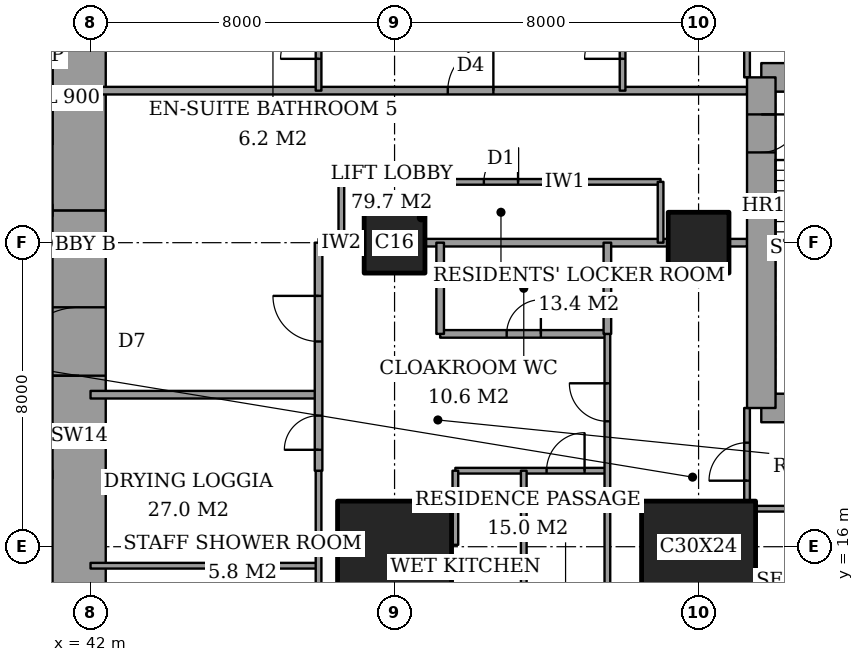
"""IFC4 building model, lengths in metres.
Left out: names, types, materials, properties, quantities, classifications, styles, units other than length and angle.
Written with IfcOpenShell. Run it as: python <this file> out.ifc"""

import sys

from ifc_helpers import new_model, si_unit, direction, frame, frame_2d, origin, origin_2d, place, context, subcontext, project, spatial, rectangle, extrude, element, fill, save


model = new_model("IFC4")
c1 = context("Model", 3, precision=1e-05, world=origin(), true_north=direction((0.0, 1.0)))
c2 = subcontext(c1, "Body", "Model", "MODEL_VIEW")
j1 = project(units=[si_unit("LENGTHUNIT", "METRE"), si_unit("PLANEANGLEUNIT", "RADIAN")], contexts=[c1])
p1 = place(None, origin())
s1 = spatial("IfcSite", under=j1, at=p1, CompositionType="ELEMENT")
p2 = place(p1, origin())
s2 = spatial("IfcBuilding", under=s1, at=p2, CompositionType="ELEMENT")
p3 = place(p2, frame((0.0, 0.0, 252.0)))
s3 = spatial("IfcBuildingStorey", under=s2, at=p3, CompositionType="ELEMENT", Elevation=252.0)
p4 = place(p3, frame((50.0, 16.0, 0.0), z_axis=(0.0, 0.0, 1.0), x_axis=(1.0, 0.0, 0.0)))
e1 = element("IfcColumn", 1, at=p4, inside=s3, PredefinedType="COLUMN", context=c2, shape_type="SweptSolid", body=[
    extrude(rectangle(XDim=3.0, YDim=2.4, at=origin_2d()), origin(), (0.0, 0.0, 1.0), 3.6),
])
p5 = place(p3, frame((50.0, 24.0, 0.0), z_axis=(0.0, 0.0, 1.0), x_axis=(1.0, 0.0, 0.0)))
e2 = element("IfcColumn", 2, at=p5, inside=s3, PredefinedType="COLUMN", context=c2, shape_type="SweptSolid", body=[
    extrude(rectangle(XDim=1.6, YDim=1.6, at=origin_2d()), origin(), (0.0, 0.0, 1.0), 3.6),
])
p6 = place(p3, frame((58.0, 16.0, 0.0), z_axis=(0.0, 0.0, 1.0), x_axis=(1.0, 0.0, 0.0)))
e3 = element("IfcColumn", 3, at=p6, inside=s3, PredefinedType="COLUMN", context=c2, shape_type="SweptSolid", body=[
    extrude(rectangle(XDim=3.0, YDim=2.4, at=origin_2d()), origin(), (0.0, 0.0, 1.0), 3.6),
])
p7 = place(p3, frame((58.0, 24.0, 0.0), z_axis=(0.0, 0.0, 1.0), x_axis=(1.0, 0.0, 0.0)))
e4 = element("IfcColumn", 4, at=p7, inside=s3, PredefinedType="COLUMN", context=c2, shape_type="SweptSolid", body=[
    extrude(rectangle(XDim=1.6, YDim=1.6, at=origin_2d()), origin(), (0.0, 0.0, 1.0), 3.6),
])
p8 = place(p3, frame((41.7, 13.0, 0.0), z_axis=(0.0, 0.0, 1.0), x_axis=(0.0, 1.0, 0.0)))
e5 = element("IfcWall", 5, at=p8, inside=s3, PredefinedType="SHEAR", context=c2, shape_type="SweptSolid", body=[
    extrude(rectangle(XDim=11.85, YDim=1.4, at=frame_2d((5.925, 0.0))), origin(), (0.0, 0.0, 1.0), 3.6),
])
p9 = place(p8, frame((7.5, 0.0, 0.0)))
e6 = element("IfcOpeningElement", 6, at=p9, cuts=e5, PredefinedType="OPENING", context=c2, shape_type="SweptSolid", body=[
    extrude(rectangle(XDim=1.8, YDim=2.4, at=frame_2d((0.9, 1.2))), frame((0.0, 0.71, 0.0), z_axis=(0.0, -1.0, 0.0), x_axis=(1.0, 0.0, 0.0)), (0.0, 0.0, 1.0), 1.42),
])
p10 = place(p3, frame((41.7, 24.85, 0.0), z_axis=(0.0, 0.0, 1.0), x_axis=(0.0, 1.0, 0.0)))
e7 = element("IfcWall", 7, at=p10, inside=s3, PredefinedType="SHEAR", context=c2, shape_type="SweptSolid", body=[
    extrude(rectangle(XDim=10.15, YDim=1.4, at=frame_2d((5.075, 0.0))), origin(), (0.0, 0.0, 1.0), 3.6),
])
for number, where, z_axis, x_axis in (
    (8, (59.65, 19.65, 0.0), (0.0, 0.0, 1.0), (1.0, 0.0, 0.0)),
    (9, (64.1, 28.35, 0.0), (0.0, 0.0, 1.0), (-1.0, 0.0, 0.0)),
):
    element("IfcWall", number, at=place(p3, frame(where, z_axis=z_axis, x_axis=x_axis)), inside=s3, PredefinedType="SHEAR", context=c2, shape_type="SweptSolid", body=[
        extrude(rectangle(XDim=4.45, YDim=0.75, at=frame_2d((2.225, 0.0))), origin(), (0.0, 0.0, 1.0), 3.6),
    ])
p11 = place(p3, frame((59.65, 28.35, 0.0), z_axis=(0.0, 0.0, 1.0), x_axis=(0.0, -1.0, 0.0)))
e10 = element("IfcWall", 10, at=p11, inside=s3, PredefinedType="SHEAR", context=c2, shape_type="SweptSolid", body=[
    extrude(rectangle(XDim=8.7, YDim=0.75, at=frame_2d((4.35, 0.0))), origin(), (0.0, 0.0, 1.0), 3.6),
])
p12 = place(p11, frame((0.975, 0.0, 0.0)))
e11 = element("IfcOpeningElement", 11, at=p12, cuts=e10, PredefinedType="OPENING", context=c2, shape_type="SweptSolid", body=[
    extrude(rectangle(XDim=1.0, YDim=2.1, at=frame_2d((0.5, 1.05))), frame((0.0, 0.385, 0.0), z_axis=(0.0, -1.0, 0.0), x_axis=(1.0, 0.0, 0.0)), (0.0, 0.0, 1.0), 0.77),
])
p13 = place(p3, frame((42.0, 15.5, 0.0), z_axis=(0.0, 0.0, 1.0), x_axis=(1.0, 0.0, 0.0)))
e12 = element("IfcWall", 12, at=p13, inside=s3, PredefinedType="PARTITIONING", context=c2, shape_type="SweptSolid", body=[
    extrude(rectangle(XDim=6.0, YDim=0.15, at=frame_2d((3.0, 0.0))), origin(), (0.0, 0.0, 1.0), 3.35),
])
p14 = place(p3, frame((48.0, 16.05, 0.0), z_axis=(0.0, 0.0, 1.0), x_axis=(1.0, 0.0, 0.0)))
e13 = element("IfcWall", 13, at=p14, inside=s3, PredefinedType="PARTITIONING", context=c2, shape_type="SweptSolid", body=[
    extrude(rectangle(XDim=0.5, YDim=0.15, at=frame_2d((0.25, 0.0))), origin(), (0.0, 0.0, 1.0), 2.634),
])
p15 = place(p3, frame((59.5, 17.0, 0.0), z_axis=(0.0, 0.0, 1.0), x_axis=(1.0, 0.0, 0.0)))
e14 = element("IfcWall", 14, at=p15, inside=s3, PredefinedType="PARTITIONING", context=c2, shape_type="SweptSolid", body=[
    extrude(rectangle(XDim=6.95, YDim=0.15, at=frame_2d((3.475, 0.0))), origin(), (0.0, 0.0, 1.0), 3.35),
])
p16 = place(p3, frame((51.6, 18.0, 0.0), z_axis=(0.0, 0.0, 1.0), x_axis=(1.0, 0.0, 0.0)))
e15 = element("IfcWall", 15, at=p16, inside=s3, PredefinedType="PARTITIONING", context=c2, shape_type="SweptSolid", body=[
    extrude(rectangle(XDim=4.0, YDim=0.15, at=frame_2d((2.0, 0.0))), origin(), (0.0, 0.0, 1.0), 3.35),
])
p17 = place(p16, frame((2.4, 0.0, 0.0)))
e16 = element("IfcOpeningElement", 16, at=p17, cuts=e15, PredefinedType="OPENING", context=c2, shape_type="SweptSolid", body=[
    extrude(rectangle(XDim=1.0, YDim=2.1, at=frame_2d((0.5, 1.05))), frame((0.0, 0.085, 0.0), z_axis=(0.0, -1.0, 0.0), x_axis=(1.0, 0.0, 0.0)), (0.0, 0.0, 1.0), 0.17),
])
p18 = place(p3, frame((42.0, 20.0, 0.0), z_axis=(0.0, 0.0, 1.0), x_axis=(1.0, 0.0, 0.0)))
e17 = element("IfcWall", 17, at=p18, inside=s3, PredefinedType="PARTITIONING", context=c2, shape_type="SweptSolid", body=[
    extrude(rectangle(XDim=6.0, YDim=0.2, at=frame_2d((3.0, 0.0))), origin(), (0.0, 0.0, 1.0), 3.35),
])
p19 = place(p3, frame((51.2, 21.6, 0.0), z_axis=(0.0, 0.0, 1.0), x_axis=(1.0, 0.0, 0.0)))
e18 = element("IfcWall", 18, at=p19, inside=s3, PredefinedType="PARTITIONING", context=c2, shape_type="SweptSolid", body=[
    extrude(rectangle(XDim=4.4, YDim=0.2, at=frame_2d((2.2, 0.0))), origin(), (0.0, 0.0, 1.0), 3.35),
])
p20 = place(p19, frame((1.75, 0.0, 0.0)))
e19 = element("IfcOpeningElement", 19, at=p20, cuts=e18, PredefinedType="OPENING", context=c2, shape_type="SweptSolid", body=[
    extrude(rectangle(XDim=0.9, YDim=2.1, at=frame_2d((0.45, 1.05))), frame((0.0, 0.11, 0.0), z_axis=(0.0, -1.0, 0.0), x_axis=(1.0, 0.0, 0.0)), (0.0, 0.0, 1.0), 0.22),
])
p21 = place(p3, frame((48.0, 24.0, 0.0), z_axis=(0.0, 0.0, 1.0), x_axis=(1.0, 0.0, 0.0)))
e20 = element("IfcWall", 20, at=p21, inside=s3, PredefinedType="PARTITIONING", context=c2, shape_type="SweptSolid", body=[
    extrude(rectangle(XDim=1.2, YDim=0.2, at=frame_2d((0.6, 0.0))), origin(), (0.0, 0.0, 1.0), 3.35),
])
p22 = place(p3, frame((50.8, 24.0, 0.0), z_axis=(0.0, 0.0, 1.0), x_axis=(1.0, 0.0, 0.0)))
e21 = element("IfcWall", 21, at=p22, inside=s3, PredefinedType="PARTITIONING", context=c2, shape_type="SweptSolid", body=[
    extrude(rectangle(XDim=6.4, YDim=0.2, at=frame_2d((3.2, 0.0))), origin(), (0.0, 0.0, 1.0), 3.35),
])
p23 = place(p3, frame((58.8, 24.0, 0.0), z_axis=(0.0, 0.0, 1.0), x_axis=(1.0, 0.0, 0.0)))
e22 = element("IfcWall", 22, at=p23, inside=s3, PredefinedType="PARTITIONING", context=c2, shape_type="SweptSolid", body=[
    extrude(rectangle(XDim=0.475, YDim=0.2, at=frame_2d((0.237, 0.0))), origin(), (0.0, 0.0, 1.0), 3.35),
])
p24 = place(p3, frame((48.6, 25.6, 0.0), z_axis=(0.0, 0.0, 1.0), x_axis=(1.0, 0.0, 0.0)))
e23 = element("IfcWall", 23, at=p24, inside=s3, PredefinedType="PARTITIONING", context=c2, shape_type="SweptSolid", body=[
    extrude(rectangle(XDim=8.4, YDim=0.15, at=frame_2d((4.2, 0.0))), origin(), (0.0, 0.0, 1.0), 3.35),
])
p25 = place(p24, frame((3.75, 0.0, 0.0)))
e24 = element("IfcOpeningElement", 24, at=p25, cuts=e23, PredefinedType="OPENING", context=c2, shape_type="SweptSolid", body=[
    extrude(rectangle(XDim=0.9, YDim=2.1, at=frame_2d((0.45, 1.05))), frame((0.0, 0.085, 0.0), z_axis=(0.0, -1.0, 0.0), x_axis=(1.0, 0.0, 0.0)), (0.0, 0.0, 1.0), 0.17),
])
p26 = place(p3, frame((42.0, 28.0, 0.0), z_axis=(0.0, 0.0, 1.0), x_axis=(1.0, 0.0, 0.0)))
e25 = element("IfcWall", 25, at=p26, inside=s3, PredefinedType="PARTITIONING", context=c2, shape_type="SweptSolid", body=[
    extrude(rectangle(XDim=17.275, YDim=0.2, at=frame_2d((8.637, 0.0))), origin(), (0.0, 0.0, 1.0), 3.35),
])
p27 = place(p26, frame((9.4, 0.0, 0.0)))
e26 = element("IfcOpeningElement", 26, at=p27, cuts=e25, PredefinedType="OPENING", context=c2, shape_type="SweptSolid", body=[
    extrude(rectangle(XDim=1.2, YDim=2.4, at=frame_2d((0.6, 1.2))), frame((0.0, 0.11, 0.0), z_axis=(0.0, -1.0, 0.0), x_axis=(1.0, 0.0, 0.0)), (0.0, 0.0, 1.0), 0.22),
])
p28 = place(p3, frame((45.6, 13.1, 0.0), z_axis=(0.0, 0.0, 1.0), x_axis=(0.0, 1.0, 0.0)))
e27 = element("IfcWall", 27, at=p28, inside=s3, PredefinedType="PARTITIONING", context=c2, shape_type="SweptSolid", body=[
    extrude(rectangle(XDim=2.4, YDim=0.15, at=frame_2d((1.2, 0.0))), origin(), (0.0, 0.0, 1.0), 3.35),
])
p29 = place(p28, frame((0.75, 0.0, 0.0)))
e28 = element("IfcOpeningElement", 28, at=p29, cuts=e27, PredefinedType="OPENING", context=c2, shape_type="SweptSolid", body=[
    extrude(rectangle(XDim=0.9, YDim=2.1, at=frame_2d((0.45, 1.05))), frame((0.0, 0.085, 0.0), z_axis=(0.0, -1.0, 0.0), x_axis=(1.0, 0.0, 0.0)), (0.0, 0.0, 1.0), 0.17),
])
p30 = place(p3, frame((48.0, 18.0, 0.0), z_axis=(0.0, 0.0, 1.0), x_axis=(0.0, 1.0, 0.0)))
e29 = element("IfcWall", 29, at=p30, inside=s3, PredefinedType="PARTITIONING", context=c2, shape_type="SweptSolid", body=[
    extrude(rectangle(XDim=6.0, YDim=0.2, at=frame_2d((3.0, 0.0))), origin(), (0.0, 0.0, 1.0), 3.35),
])
p31 = place(p30, frame((3.4, 0.0, 0.0)))
e30 = element("IfcOpeningElement", 30, at=p31, cuts=e29, PredefinedType="OPENING", context=c2, shape_type="SweptSolid", body=[
    extrude(rectangle(XDim=1.2, YDim=2.4, at=frame_2d((0.6, 1.2))), frame((0.0, 0.11, 0.0), z_axis=(0.0, -1.0, 0.0), x_axis=(1.0, 0.0, 0.0)), (0.0, 0.0, 1.0), 0.22),
])
p32 = place(p30, frame((0.55, 0.0, 0.0)))
e31 = element("IfcOpeningElement", 31, at=p32, cuts=e29, PredefinedType="OPENING", context=c2, shape_type="SweptSolid", body=[
    extrude(rectangle(XDim=0.9, YDim=2.1, at=frame_2d((0.45, 1.05))), frame((0.0, 0.11, 0.0), z_axis=(0.0, -1.0, 0.0), x_axis=(1.0, 0.0, 0.0)), (0.0, 0.0, 1.0), 0.22),
])
p33 = place(p3, frame((48.0, 11.2, 0.0), z_axis=(0.0, 0.0, 1.0), x_axis=(0.0, 1.0, 0.0)))
e32 = element("IfcWall", 32, at=p33, inside=s3, PredefinedType="PARTITIONING", context=c2, shape_type="SweptSolid", body=[
    extrude(rectangle(XDim=6.8, YDim=0.15, at=frame_2d((3.4, 0.0))), origin(), (0.0, 0.0, 1.0), 3.35),
])
p34 = place(p3, frame((48.0, 28.0, 0.0), z_axis=(0.0, 0.0, 1.0), x_axis=(0.0, 1.0, 0.0)))
e33 = element("IfcWall", 33, at=p34, inside=s3, PredefinedType="PARTITIONING", context=c2, shape_type="SweptSolid", body=[
    extrude(rectangle(XDim=9.4, YDim=0.15, at=frame_2d((4.7, 0.0))), origin(), (0.0, 0.0, 1.0), 3.35),
])
p35 = place(p34, frame((0.837, 0.0, 0.0)))
e34 = element("IfcOpeningElement", 34, at=p35, cuts=e33, PredefinedType="OPENING", context=c2, shape_type="SweptSolid", body=[
    extrude(rectangle(XDim=1.0, YDim=2.1, at=frame_2d((0.5, 1.05))), frame((0.0, 0.085, 0.0), z_axis=(0.0, -1.0, 0.0), x_axis=(1.0, 0.0, 0.0)), (0.0, 0.0, 1.0), 0.17),
])
p36 = place(p3, frame((48.6, 24.0, 0.0), z_axis=(0.0, 0.0, 1.0), x_axis=(0.0, 1.0, 0.0)))
e35 = element("IfcWall", 35, at=p36, inside=s3, PredefinedType="PARTITIONING", context=c2, shape_type="SweptSolid", body=[
    extrude(rectangle(XDim=1.6, YDim=0.15, at=frame_2d((0.8, 0.0))), origin(), (0.0, 0.0, 1.0), 3.35),
])
p37 = place(p3, frame((51.2, 21.6, 0.0), z_axis=(0.0, 0.0, 1.0), x_axis=(0.0, 1.0, 0.0)))
e36 = element("IfcWall", 36, at=p37, inside=s3, PredefinedType="PARTITIONING", context=c2, shape_type="SweptSolid", body=[
    extrude(rectangle(XDim=2.4, YDim=0.2, at=frame_2d((1.2, 0.0))), origin(), (0.0, 0.0, 1.0), 3.35),
])
p38 = place(p3, frame((51.6, 16.05, 0.0), z_axis=(0.0, 0.0, 1.0), x_axis=(0.0, 1.0, 0.0)))
e37 = element("IfcWall", 37, at=p38, inside=s3, PredefinedType="PARTITIONING", context=c2, shape_type="SweptSolid", body=[
    extrude(rectangle(XDim=1.95, YDim=0.15, at=frame_2d((0.975, 0.0))), origin(), (0.0, 0.0, 1.0), 3.35),
])
p39 = place(p3, frame((53.4, 11.2, 0.0), z_axis=(0.0, 0.0, 1.0), x_axis=(0.0, 1.0, 0.0)))
e38 = element("IfcWall", 38, at=p39, inside=s3, PredefinedType="PARTITIONING", context=c2, shape_type="SweptSolid", body=[
    extrude(rectangle(XDim=6.8, YDim=0.15, at=frame_2d((3.4, 0.0))), origin(), (0.0, 0.0, 1.0), 3.35),
])
p40 = place(p3, frame((55.6, 21.6, 0.0), z_axis=(0.0, 0.0, 1.0), x_axis=(0.0, 1.0, 0.0)))
e39 = element("IfcWall", 39, at=p40, inside=s3, PredefinedType="PARTITIONING", context=c2, shape_type="SweptSolid", body=[
    extrude(rectangle(XDim=2.4, YDim=0.2, at=frame_2d((1.2, 0.0))), origin(), (0.0, 0.0, 1.0), 3.35),
])
p41 = place(p3, frame((55.6, 14.6, 0.0), z_axis=(0.0, 0.0, 1.0), x_axis=(0.0, 1.0, 0.0)))
e40 = element("IfcWall", 40, at=p41, inside=s3, PredefinedType="PARTITIONING", context=c2, shape_type="SweptSolid", body=[
    extrude(rectangle(XDim=7.0, YDim=0.15, at=frame_2d((3.5, 0.0))), origin(), (0.0, 0.0, 1.0), 3.35),
])
p42 = place(p41, frame((4.7, 0.0, 0.0)))
e41 = element("IfcOpeningElement", 41, at=p42, cuts=e40, PredefinedType="OPENING", context=c2, shape_type="SweptSolid", body=[
    extrude(rectangle(XDim=1.0, YDim=2.1, at=frame_2d((0.5, 1.05))), frame((0.0, 0.085, 0.0), z_axis=(0.0, -1.0, 0.0), x_axis=(1.0, 0.0, 0.0)), (0.0, 0.0, 1.0), 0.17),
])
p43 = place(p3, frame((56.0, 28.0, 0.0), z_axis=(0.0, 0.0, 1.0), x_axis=(0.0, 1.0, 0.0)))
e42 = element("IfcWall", 42, at=p43, inside=s3, PredefinedType="PARTITIONING", context=c2, shape_type="SweptSolid", body=[
    extrude(rectangle(XDim=9.4, YDim=0.15, at=frame_2d((4.7, 0.0))), origin(), (0.0, 0.0, 1.0), 3.35),
])
p44 = place(p43, frame((0.837, 0.0, 0.0)))
e43 = element("IfcOpeningElement", 43, at=p44, cuts=e42, PredefinedType="OPENING", context=c2, shape_type="SweptSolid", body=[
    extrude(rectangle(XDim=1.0, YDim=2.1, at=frame_2d((0.5, 1.05))), frame((0.0, 0.085, 0.0), z_axis=(0.0, -1.0, 0.0), x_axis=(1.0, 0.0, 0.0)), (0.0, 0.0, 1.0), 0.17),
])
p45 = place(p3, frame((57.0, 24.0, 0.0), z_axis=(0.0, 0.0, 1.0), x_axis=(0.0, 1.0, 0.0)))
e44 = element("IfcWall", 44, at=p45, inside=s3, PredefinedType="PARTITIONING", context=c2, shape_type="SweptSolid", body=[
    extrude(rectangle(XDim=1.6, YDim=0.15, at=frame_2d((0.8, 0.0))), origin(), (0.0, 0.0, 1.0), 3.35),
])
p46 = place(p3, frame((59.275, 17.2, 0.0), z_axis=(0.0, 0.0, 1.0), x_axis=(0.0, 1.0, 0.0)))
e45 = element("IfcWall", 45, at=p46, inside=s3, PredefinedType="PARTITIONING", context=c2, shape_type="SweptSolid", body=[
    extrude(rectangle(XDim=2.45, YDim=0.15, at=frame_2d((1.225, 0.0))), origin(), (0.0, 0.0, 1.0), 3.35),
])
p47 = place(p46, frame((0.538, 0.0, 0.0)))
e46 = element("IfcOpeningElement", 46, at=p47, cuts=e45, PredefinedType="OPENING", context=c2, shape_type="SweptSolid", body=[
    extrude(rectangle(XDim=1.0, YDim=2.1, at=frame_2d((0.5, 1.05))), frame((0.0, 0.085, 0.0), z_axis=(0.0, -1.0, 0.0), x_axis=(1.0, 0.0, 0.0)), (0.0, 0.0, 1.0), 0.17),
])
p48 = place(p3, frame((59.275, 28.35, 0.0), z_axis=(0.0, 0.0, 1.0), x_axis=(0.0, 1.0, 0.0)))
e47 = element("IfcWall", 47, at=p48, inside=s3, PredefinedType="PARTITIONING", context=c2, shape_type="SweptSolid", body=[
    extrude(rectangle(XDim=2.45, YDim=0.15, at=frame_2d((1.225, 0.0))), origin(), (0.0, 0.0, 1.0), 3.35),
])
p49 = place(p48, frame((0.962, 0.0, 0.0)))
e48 = element("IfcOpeningElement", 48, at=p49, cuts=e47, PredefinedType="OPENING", context=c2, shape_type="SweptSolid", body=[
    extrude(rectangle(XDim=0.9, YDim=2.1, at=frame_2d((0.45, 1.05))), frame((0.0, 0.085, 0.0), z_axis=(0.0, -1.0, 0.0), x_axis=(1.0, 0.0, 0.0)), (0.0, 0.0, 1.0), 0.17),
])
p50 = place(p3, frame((28.3, 17.9, 0.0), z_axis=(0.0, 0.0, 1.0), x_axis=(1.0, 0.0, 0.0)))
e49 = element("IfcWall", 49, at=p50, inside=s3, PredefinedType="PARTITIONING", context=c2, shape_type="SweptSolid", body=[
    extrude(rectangle(XDim=12.7, YDim=0.2, at=frame_2d((6.35, 0.0))), origin(), (0.0, 0.0, 1.0), 3.6),
])
p51 = place(p50, frame((1.05, 0.0, 0.0)))
e50 = element("IfcOpeningElement", 50, at=p51, cuts=e49, PredefinedType="OPENING", context=c2, shape_type="SweptSolid", body=[
    extrude(rectangle(XDim=0.9, YDim=2.1, at=frame_2d((0.45, 1.05))), frame((0.0, 0.11, 0.0), z_axis=(0.0, -1.0, 0.0), x_axis=(1.0, 0.0, 0.0)), (0.0, 0.0, 1.0), 0.22),
])
p52 = place(p50, frame((4.2, 0.0, 0.0)))
e51 = element("IfcOpeningElement", 51, at=p52, cuts=e49, PredefinedType="OPENING", context=c2, shape_type="SweptSolid", body=[
    extrude(rectangle(XDim=1.0, YDim=2.1, at=frame_2d((0.5, 1.05))), frame((0.0, 0.11, 0.0), z_axis=(0.0, -1.0, 0.0), x_axis=(1.0, 0.0, 0.0)), (0.0, 0.0, 1.0), 0.22),
])
p53 = place(p50, frame((10.6, 0.0, 0.0)))
e52 = element("IfcOpeningElement", 52, at=p53, cuts=e49, PredefinedType="OPENING", context=c2, shape_type="SweptSolid", body=[
    extrude(rectangle(XDim=1.2, YDim=2.1, at=frame_2d((0.6, 1.05))), frame((0.0, 0.11, 0.0), z_axis=(0.0, -1.0, 0.0), x_axis=(1.0, 0.0, 0.0)), (0.0, 0.0, 1.0), 0.22),
])
p54 = place(p47, origin())
e53 = element("IfcDoor", 53, at=p54, inside=s3, OperationType="SINGLE_SWING_RIGHT", PredefinedType="DOOR", context=c2, shape_type="SweptSolid", body=[
    extrude(rectangle(XDim=1.0, YDim=2.1, at=frame_2d((0.5, 1.05))), frame((0.0, 0.025, 0.0), z_axis=(0.0, -1.0, 0.0), x_axis=(1.0, 0.0, 0.0)), (0.0, 0.0, 1.0), 0.05),
])
fill(e46, e53)
p55 = place(p42, origin())
e54 = element("IfcDoor", 54, at=p55, inside=s3, OperationType="SINGLE_SWING_LEFT", PredefinedType="DOOR", context=c2, shape_type="SweptSolid", body=[
    extrude(rectangle(XDim=1.0, YDim=2.1, at=frame_2d((0.5, 1.05))), frame((0.0, 0.025, 0.0), z_axis=(0.0, -1.0, 0.0), x_axis=(1.0, 0.0, 0.0)), (0.0, 0.0, 1.0), 0.05),
])
fill(e41, e54)
p56 = place(p20, origin())
e55 = element("IfcDoor", 55, at=p56, inside=s3, OperationType="SINGLE_SWING_LEFT", PredefinedType="DOOR", context=c2, shape_type="SweptSolid", body=[
    extrude(rectangle(XDim=0.9, YDim=2.1, at=frame_2d((0.45, 1.05))), frame((0.0, 0.025, 0.0), z_axis=(0.0, -1.0, 0.0), x_axis=(1.0, 0.0, 0.0)), (0.0, 0.0, 1.0), 0.05),
])
fill(e19, e55)
p57 = place(p31, origin())
e56 = element("IfcDoor", 56, at=p57, inside=s3, OperationType="SINGLE_SWING_LEFT", PredefinedType="DOOR", context=c2, shape_type="SweptSolid", body=[
    extrude(rectangle(XDim=1.2, YDim=2.4, at=frame_2d((0.6, 1.2))), frame((0.0, 0.025, 0.0), z_axis=(0.0, -1.0, 0.0), x_axis=(1.0, 0.0, 0.0)), (0.0, 0.0, 1.0), 0.05),
])
fill(e30, e56)
p58 = place(p17, origin())
e57 = element("IfcDoor", 57, at=p58, inside=s3, OperationType="SINGLE_SWING_LEFT", PredefinedType="DOOR", context=c2, shape_type="SweptSolid", body=[
    extrude(rectangle(XDim=1.0, YDim=2.1, at=frame_2d((0.5, 1.05))), frame((0.0, 0.025, 0.0), z_axis=(0.0, -1.0, 0.0), x_axis=(1.0, 0.0, 0.0)), (0.0, 0.0, 1.0), 0.05),
])
fill(e16, e57)
p59 = place(p32, origin())
e58 = element("IfcDoor", 58, at=p59, inside=s3, OperationType="SINGLE_SWING_RIGHT", PredefinedType="DOOR", context=c2, shape_type="SweptSolid", body=[
    extrude(rectangle(XDim=0.9, YDim=2.1, at=frame_2d((0.45, 1.05))), frame((0.0, 0.025, 0.0), z_axis=(0.0, -1.0, 0.0), x_axis=(1.0, 0.0, 0.0)), (0.0, 0.0, 1.0), 0.05),
])
fill(e31, e58)
p60 = place(p44, origin())
e59 = element("IfcDoor", 59, at=p60, inside=s3, OperationType="SINGLE_SWING_RIGHT", PredefinedType="DOOR", context=c2, shape_type="SweptSolid", body=[
    extrude(rectangle(XDim=1.0, YDim=2.1, at=frame_2d((0.5, 1.05))), frame((0.0, 0.025, 0.0), z_axis=(0.0, -1.0, 0.0), x_axis=(1.0, 0.0, 0.0)), (0.0, 0.0, 1.0), 0.05),
])
fill(e43, e59)
p61 = place(p27, origin())
e60 = element("IfcDoor", 60, at=p61, inside=s3, OperationType="SINGLE_SWING_LEFT", PredefinedType="DOOR", context=c2, shape_type="SweptSolid", body=[
    extrude(rectangle(XDim=1.2, YDim=2.4, at=frame_2d((0.6, 1.2))), frame((0.0, 0.025, 0.0), z_axis=(0.0, -1.0, 0.0), x_axis=(1.0, 0.0, 0.0)), (0.0, 0.0, 1.0), 0.05),
])
fill(e26, e60)
p62 = place(p35, origin())
e61 = element("IfcDoor", 61, at=p62, inside=s3, OperationType="SINGLE_SWING_RIGHT", PredefinedType="DOOR", context=c2, shape_type="SweptSolid", body=[
    extrude(rectangle(XDim=1.0, YDim=2.1, at=frame_2d((0.5, 1.05))), frame((0.0, 0.025, 0.0), z_axis=(0.0, -1.0, 0.0), x_axis=(1.0, 0.0, 0.0)), (0.0, 0.0, 1.0), 0.05),
])
fill(e34, e61)
p63 = place(p25, origin())
e62 = element("IfcDoor", 62, at=p63, inside=s3, OperationType="SINGLE_SWING_LEFT", PredefinedType="DOOR", context=c2, shape_type="SweptSolid", body=[
    extrude(rectangle(XDim=0.9, YDim=2.1, at=frame_2d((0.45, 1.05))), frame((0.0, 0.025, 0.0), z_axis=(0.0, -1.0, 0.0), x_axis=(1.0, 0.0, 0.0)), (0.0, 0.0, 1.0), 0.05),
])
fill(e24, e62)
p64 = place(p9, origin())
e63 = element("IfcDoor", 63, at=p64, inside=s3, OperationType="DOUBLE_DOOR_DOUBLE_SWING", PredefinedType="DOOR", context=c2, shape_type="SweptSolid", body=[
    extrude(rectangle(XDim=1.8, YDim=2.4, at=frame_2d((0.9, 1.2))), frame((0.0, 0.025, 0.0), z_axis=(0.0, -1.0, 0.0), x_axis=(1.0, 0.0, 0.0)), (0.0, 0.0, 1.0), 0.05),
])
fill(e6, e63)
p65 = place(p12, origin())
e64 = element("IfcDoor", 64, at=p65, inside=s3, OperationType="SINGLE_SWING_RIGHT", PredefinedType="DOOR", context=c2, shape_type="SweptSolid", body=[
    extrude(rectangle(XDim=1.0, YDim=2.1, at=frame_2d((0.5, 1.05))), frame((0.0, 0.025, 0.0), z_axis=(0.0, -1.0, 0.0), x_axis=(1.0, 0.0, 0.0)), (0.0, 0.0, 1.0), 0.05),
])
fill(e11, e64)
save(model, sys.argv[1])
